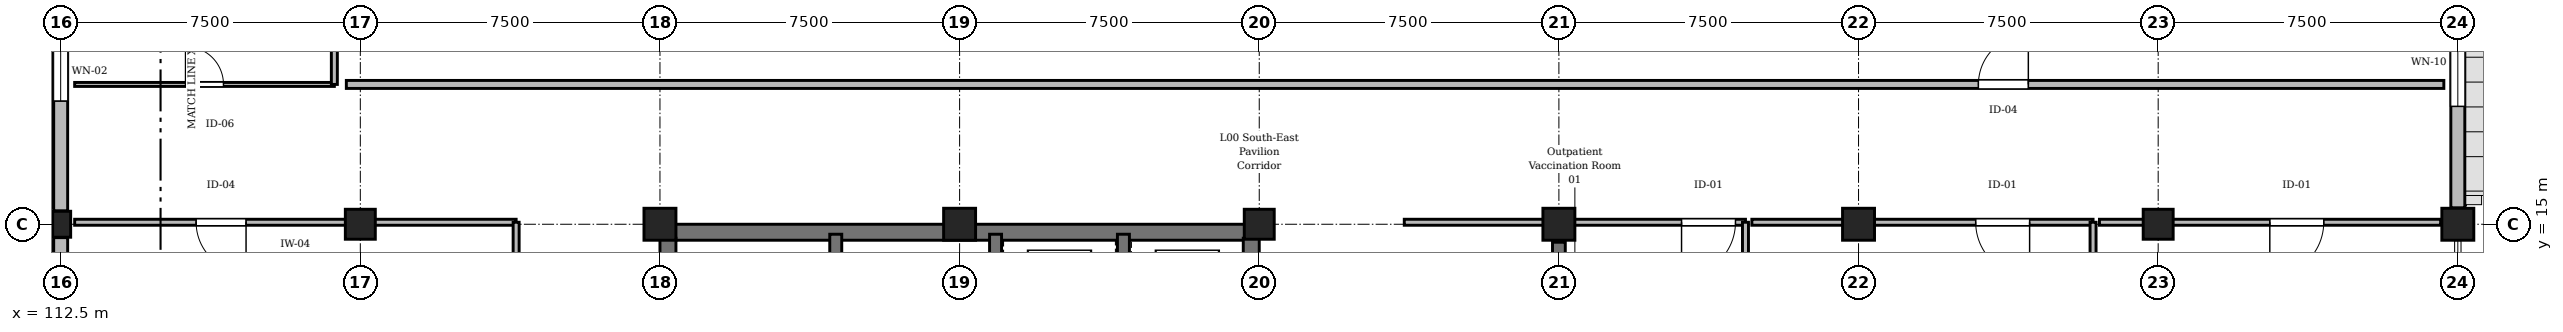
"""IFC4 building model, lengths in metres.
Left out: names, types, materials, properties, quantities, classifications, styles, units other than length and angle.
Written with IfcOpenShell. Run it as: python <this file> out.ifc"""

import sys

from ifc_helpers import new_model, si_unit, direction, frame, frame_2d, origin, origin_2d, place, context, subcontext, project, spatial, rectangle, circle, extrude, element, fill, save


model = new_model("IFC4")
c1 = context("Model", 3, precision=1e-05, world=origin(), true_north=direction((0.0, 1.0)))
c2 = subcontext(c1, "Body", "Model", "MODEL_VIEW")
j1 = project(units=[si_unit("LENGTHUNIT", "METRE"), si_unit("PLANEANGLEUNIT", "RADIAN")], contexts=[c1])
p1 = place(None, origin())
s1 = spatial("IfcSite", under=j1, at=p1, CompositionType="ELEMENT")
p2 = place(p1, origin())
s2 = spatial("IfcBuilding", under=s1, at=p2, CompositionType="ELEMENT")
p3 = place(p2, origin())
s3 = spatial("IfcBuildingStorey", under=s2, at=p3, CompositionType="ELEMENT", Elevation=0.0)
p4 = place(p3, frame((112.5, 15.0, 0.0), z_axis=(0.0, 0.0, 1.0), x_axis=(1.0, 0.0, 0.0)))
e1 = element("IfcColumn", 1, at=p4, inside=s3, PredefinedType="COLUMN", context=c2, shape_type="SweptSolid", body=[
    extrude(rectangle(XDim=0.5, YDim=0.65, at=origin_2d()), origin(), (0.0, 0.0, 1.0), 4.8),
])
p5 = place(p3, frame((120.0, 15.0, 0.0), z_axis=(0.0, 0.0, 1.0), x_axis=(1.0, 0.0, 0.0)))
e2 = element("IfcColumn", 2, at=p5, inside=s3, PredefinedType="COLUMN", context=c2, shape_type="SweptSolid", body=[
    extrude(circle(Radius=0.375, at=origin_2d()), origin(), (0.0, 0.0, 1.0), 4.8),
])
for number, where, z_axis, x_axis in (
    (3, (127.5, 15.0, 0.0), (0.0, 0.0, 1.0), (1.0, 0.0, 0.0)),
    (4, (135.0, 15.0, 0.0), (0.0, 0.0, 1.0), (1.0, 0.0, 0.0)),
):
    element("IfcColumn", number, at=place(p3, frame(where, z_axis=z_axis, x_axis=x_axis)), inside=s3, PredefinedType="COLUMN", context=c2, shape_type="SweptSolid", body=[
        extrude(rectangle(XDim=0.8, YDim=0.8, at=origin_2d()), origin(), (0.0, 0.0, 1.0), 4.8),
    ])
p6 = place(p3, frame((142.5, 15.0, 0.0), z_axis=(0.0, 0.0, 1.0), x_axis=(1.0, 0.0, 0.0)))
e5 = element("IfcColumn", 5, at=p6, inside=s3, PredefinedType="COLUMN", context=c2, shape_type="SweptSolid", body=[
    extrude(circle(Radius=0.375, at=origin_2d()), origin(), (0.0, 0.0, 1.0), 4.8),
])
for number, where, z_axis, x_axis in (
    (6, (150.0, 15.0, 0.0), (0.0, 0.0, 1.0), (1.0, 0.0, 0.0)),
    (7, (157.5, 15.0, 0.0), (0.0, 0.0, 1.0), (1.0, 0.0, 0.0)),
):
    element("IfcColumn", number, at=place(p3, frame(where, z_axis=z_axis, x_axis=x_axis)), inside=s3, PredefinedType="COLUMN", context=c2, shape_type="SweptSolid", body=[
        extrude(rectangle(XDim=0.8, YDim=0.8, at=origin_2d()), origin(), (0.0, 0.0, 1.0), 4.8),
    ])
p7 = place(p3, frame((165.0, 15.0, 0.0), z_axis=(0.0, 0.0, 1.0), x_axis=(1.0, 0.0, 0.0)))
e8 = element("IfcColumn", 8, at=p7, inside=s3, PredefinedType="COLUMN", context=c2, shape_type="SweptSolid", body=[
    extrude(circle(Radius=0.375, at=origin_2d()), origin(), (0.0, 0.0, 1.0), 4.8),
])
p8 = place(p3, frame((172.5, 15.0, 0.0), z_axis=(0.0, 0.0, 1.0), x_axis=(1.0, 0.0, 0.0)))
e9 = element("IfcColumn", 9, at=p8, inside=s3, PredefinedType="COLUMN", context=c2, shape_type="SweptSolid", body=[
    extrude(rectangle(XDim=0.8, YDim=0.8, at=origin_2d()), origin(), (0.0, 0.0, 1.0), 4.8),
])
p9 = place(p3, frame((150.0, 7.95, 0.0), z_axis=(0.0, 0.0, 1.0), x_axis=(0.0, 1.0, 0.0)))
e10 = element("IfcWall", 10, at=p9, inside=s3, PredefinedType="SHEAR", context=c2, shape_type="SweptSolid", body=[
    extrude(rectangle(XDim=6.6, YDim=0.32, at=frame_2d((3.3, 0.0))), origin(), (0.0, 0.0, 1.0), 3.95),
])
p10 = place(p3, frame((112.5, 7.885, 0.0), z_axis=(0.0, 0.0, 1.0), x_axis=(0.0, 1.0, 0.0)))
e11 = element("IfcWall", 11, at=p10, inside=s3, PredefinedType="STANDARD", context=c2, shape_type="SweptSolid", body=[
    extrude(rectangle(XDim=6.78, YDim=0.35, at=frame_2d((3.39, 0.0))), origin(), (0.0, 0.0, 1.0), 3.9),
])
p11 = place(p10, frame((2.49, 0.0, 0.9)))
e12 = element("IfcOpeningElement", 12, at=p11, cuts=e11, PredefinedType="OPENING", context=c2, shape_type="SweptSolid", body=[
    extrude(rectangle(XDim=1.8, YDim=2.4, at=frame_2d((0.9, 1.2))), frame((0.0, 0.185, 0.0), z_axis=(0.0, -1.0, 0.0), x_axis=(1.0, 0.0, 0.0)), (0.0, 0.0, 1.0), 0.37),
])
p12 = place(p3, frame((112.5, 15.335, 0.0), z_axis=(0.0, 0.0, 1.0), x_axis=(0.0, 1.0, 0.0)))
e13 = element("IfcWall", 13, at=p12, inside=s3, PredefinedType="STANDARD", context=c2, shape_type="SweptSolid", body=[
    extrude(rectangle(XDim=6.995, YDim=0.35, at=frame_2d((3.498, 0.0))), origin(), (0.0, 0.0, 1.0), 3.9),
])
p13 = place(p12, frame((2.748, 0.0, 0.9)))
e14 = element("IfcOpeningElement", 14, at=p13, cuts=e13, PredefinedType="OPENING", context=c2, shape_type="SweptSolid", body=[
    extrude(rectangle(XDim=1.5, YDim=2.4, at=frame_2d((0.75, 1.2))), frame((0.0, 0.185, 0.0), z_axis=(0.0, -1.0, 0.0), x_axis=(1.0, 0.0, 0.0)), (0.0, 0.0, 1.0), 0.37),
])
p14 = place(p3, frame((172.5, 22.09, 0.0), z_axis=(0.0, 0.0, 1.0), x_axis=(0.0, -1.0, 0.0)))
e15 = element("IfcWall", 15, at=p14, inside=s3, PredefinedType="STANDARD", context=c2, shape_type="SweptSolid", body=[
    extrude(rectangle(XDim=6.68, YDim=0.35, at=frame_2d((3.34, 0.0))), origin(), (0.0, 0.0, 1.0), 3.9),
])
p15 = place(p14, frame((2.54, 0.0, 0.9)))
e16 = element("IfcOpeningElement", 16, at=p15, cuts=e15, PredefinedType="OPENING", context=c2, shape_type="SweptSolid", body=[
    extrude(rectangle(XDim=1.6, YDim=1.95, at=frame_2d((0.8, 0.975))), frame((0.0, 0.185, 0.0), z_axis=(0.0, -1.0, 0.0), x_axis=(1.0, 0.0, 0.0)), (0.0, 0.0, 1.0), 0.37),
])
p16 = place(p3, frame((127.85, 14.8, 0.0), z_axis=(0.0, 0.0, 1.0), x_axis=(1.0, 0.0, 0.0)))
e17 = element("IfcWall", 17, at=p16, inside=s3, PredefinedType="SHEAR", context=c2, shape_type="SweptSolid", body=[
    extrude(rectangle(XDim=14.3, YDim=0.4, at=frame_2d((7.15, 0.0))), origin(), (0.0, 0.0, 1.0), 4.5),
])
p17 = place(p3, frame((127.7, 7.85, 0.0), z_axis=(0.0, 0.0, 1.0), x_axis=(0.0, 1.0, 0.0)))
e18 = element("IfcWall", 18, at=p17, inside=s3, PredefinedType="SHEAR", context=c2, shape_type="SweptSolid", body=[
    extrude(rectangle(XDim=6.8, YDim=0.4, at=frame_2d((3.4, 0.0))), origin(), (0.0, 0.0, 1.0), 4.5),
])
p18 = place(p3, frame((142.3, 11.6, 0.0), z_axis=(0.0, 0.0, 1.0), x_axis=(0.0, 1.0, 0.0)))
e19 = element("IfcWall", 19, at=p18, inside=s3, PredefinedType="SHEAR", context=c2, shape_type="SweptSolid", body=[
    extrude(rectangle(XDim=3.05, YDim=0.4, at=frame_2d((1.525, 0.0))), origin(), (0.0, 0.0, 1.0), 4.5),
])
for number, where, z_axis, x_axis in (
    (20, (131.9, 11.6, 0.0), (0.0, 0.0, 1.0), (0.0, 1.0, 0.0)),
    (21, (135.9, 11.6, 0.0), (0.0, 0.0, 1.0), (0.0, 1.0, 0.0)),
    (22, (139.1, 11.6, 0.0), (0.0, 0.0, 1.0), (0.0, 1.0, 0.0)),
):
    element("IfcWall", number, at=place(p3, frame(where, z_axis=z_axis, x_axis=x_axis)), inside=s3, PredefinedType="SHEAR", context=c2, shape_type="SweptSolid", body=[
        extrude(rectangle(XDim=3.15, YDim=0.3, at=frame_2d((1.575, 0.0))), origin(), (0.0, 0.0, 1.0), 4.5),
    ])
p19 = place(p3, frame((123.9, 15.05, 0.0), z_axis=(0.0, 0.0, 1.0), x_axis=(-1.0, 0.0, 0.0)))
e23 = element("IfcWall", 23, at=p19, inside=s3, PredefinedType="PARTITIONING", context=c2, shape_type="SweptSolid", body=[
    extrude(rectangle(XDim=11.05, YDim=0.15, at=frame_2d((5.525, 0.0))), origin(), (0.0, 0.0, 1.0), 3.835),
])
p20 = place(p19, frame((6.76, 0.0, 0.0)))
e24 = element("IfcOpeningElement", 24, at=p20, cuts=e23, PredefinedType="OPENING", context=c2, shape_type="SweptSolid", body=[
    extrude(rectangle(XDim=1.25, YDim=2.2, at=frame_2d((0.625, 1.1))), frame((0.0, 0.085, 0.0), z_axis=(0.0, -1.0, 0.0), x_axis=(1.0, 0.0, 0.0)), (0.0, 0.0, 1.0), 0.17),
])
p21 = place(p3, frame((154.67, 15.05, 0.0), z_axis=(0.0, 0.0, 1.0), x_axis=(-1.0, 0.0, 0.0)))
e25 = element("IfcWall", 25, at=p21, inside=s3, PredefinedType="PARTITIONING", context=c2, shape_type="SweptSolid", body=[
    extrude(rectangle(XDim=8.54, YDim=0.15, at=frame_2d((4.27, 0.0))), origin(), (0.0, 0.0, 1.0), 3.835),
])
p22 = place(p21, frame((0.25, 0.0, 0.0)))
e26 = element("IfcOpeningElement", 26, at=p22, cuts=e25, PredefinedType="OPENING", context=c2, shape_type="SweptSolid", body=[
    extrude(rectangle(XDim=1.35, YDim=2.25, at=frame_2d((0.675, 1.125))), frame((0.0, 0.085, 0.0), z_axis=(0.0, -1.0, 0.0), x_axis=(1.0, 0.0, 0.0)), (0.0, 0.0, 1.0), 0.17),
])
p23 = place(p3, frame((163.37, 15.05, 0.0), z_axis=(0.0, 0.0, 1.0), x_axis=(-1.0, 0.0, 0.0)))
e27 = element("IfcWall", 27, at=p23, inside=s3, PredefinedType="PARTITIONING", context=c2, shape_type="SweptSolid", body=[
    extrude(rectangle(XDim=8.54, YDim=0.15, at=frame_2d((4.27, 0.0))), origin(), (0.0, 0.0, 1.0), 3.835),
])
p24 = place(p23, frame((1.588, 0.0, 0.0)))
e28 = element("IfcOpeningElement", 28, at=p24, cuts=e27, PredefinedType="OPENING", context=c2, shape_type="SweptSolid", body=[
    extrude(rectangle(XDim=1.35, YDim=2.25, at=frame_2d((0.675, 1.125))), frame((0.0, 0.085, 0.0), z_axis=(0.0, -1.0, 0.0), x_axis=(1.0, 0.0, 0.0)), (0.0, 0.0, 1.0), 0.17),
])
p25 = place(p3, frame((172.07, 15.05, 0.0), z_axis=(0.0, 0.0, 1.0), x_axis=(-1.0, 0.0, 0.0)))
e29 = element("IfcWall", 29, at=p25, inside=s3, PredefinedType="PARTITIONING", context=c2, shape_type="SweptSolid", body=[
    extrude(rectangle(XDim=8.54, YDim=0.15, at=frame_2d((4.27, 0.0))), origin(), (0.0, 0.0, 1.0), 3.835),
])
p26 = place(p25, frame((2.926, 0.0, 0.0)))
e30 = element("IfcOpeningElement", 30, at=p26, cuts=e29, PredefinedType="OPENING", context=c2, shape_type="SweptSolid", body=[
    extrude(rectangle(XDim=1.35, YDim=2.25, at=frame_2d((0.675, 1.125))), frame((0.0, 0.085, 0.0), z_axis=(0.0, -1.0, 0.0), x_axis=(1.0, 0.0, 0.0)), (0.0, 0.0, 1.0), 0.17),
])
p27 = place(p3, frame((112.85, 18.5, 0.0), z_axis=(0.0, 0.0, 1.0), x_axis=(1.0, 0.0, 0.0)))
e31 = element("IfcWall", 31, at=p27, inside=s3, PredefinedType="PARTITIONING", context=c2, shape_type="SweptSolid", body=[
    extrude(rectangle(XDim=6.5, YDim=0.1, at=frame_2d((3.25, 0.0))), origin(), (0.0, 0.0, 1.0), 4.485),
])
p28 = place(p27, frame((2.775, 0.0, 0.0)))
e32 = element("IfcOpeningElement", 32, at=p28, cuts=e31, PredefinedType="OPENING", context=c2, shape_type="SweptSolid", body=[
    extrude(rectangle(XDim=0.95, YDim=2.15, at=frame_2d((0.475, 1.075))), frame((0.0, 0.06, 0.0), z_axis=(0.0, -1.0, 0.0), x_axis=(1.0, 0.0, 0.0)), (0.0, 0.0, 1.0), 0.12),
])
p29 = place(p3, frame((119.65, 18.5, 0.0), z_axis=(0.0, 0.0, 1.0), x_axis=(1.0, 0.0, 0.0)))
e33 = element("IfcWall", 33, at=p29, inside=s3, PredefinedType="STANDARD", context=c2, shape_type="SweptSolid", body=[
    extrude(rectangle(XDim=52.5, YDim=0.2, at=frame_2d((26.25, 0.0))), origin(), (0.0, 0.0, 1.0), 4.485),
])
p30 = place(p29, frame((40.85, 0.0, 0.0)))
e34 = element("IfcOpeningElement", 34, at=p30, cuts=e33, PredefinedType="OPENING", context=c2, shape_type="SweptSolid", body=[
    extrude(rectangle(XDim=1.25, YDim=2.2, at=frame_2d((0.625, 1.1))), frame((0.0, 0.11, 0.0), z_axis=(0.0, -1.0, 0.0), x_axis=(1.0, 0.0, 0.0)), (0.0, 0.0, 1.0), 0.22),
])
for number, where, z_axis, x_axis in (
    (35, (123.9, 7.85, 0.0), (0.0, 0.0, 1.0), (0.0, 1.0, 0.0)),
    (36, (154.67, 7.85, 0.0), (0.0, 0.0, 1.0), (0.0, 1.0, 0.0)),
    (37, (163.37, 7.85, 0.0), (0.0, 0.0, 1.0), (0.0, 1.0, 0.0)),
):
    element("IfcWall", number, at=place(p3, frame(where, z_axis=z_axis, x_axis=x_axis)), inside=s3, PredefinedType="PARTITIONING", context=c2, shape_type="SweptSolid", body=[
        extrude(rectangle(XDim=7.2, YDim=0.15, at=frame_2d((3.6, 0.0))), origin(), (0.0, 0.0, 1.0), 4.485),
    ])
p31 = place(p3, frame((119.35, 18.5, 0.0), z_axis=(0.0, 0.0, 1.0), x_axis=(0.0, 1.0, 0.0)))
e38 = element("IfcWall", 38, at=p31, inside=s3, PredefinedType="PARTITIONING", context=c2, shape_type="SweptSolid", body=[
    extrude(rectangle(XDim=3.65, YDim=0.15, at=frame_2d((1.825, 0.0))), origin(), (0.0, 0.0, 1.0), 4.485),
])
p32 = place(p13, origin())
e39 = element("IfcWindow", 39, at=p32, inside=s3, PartitioningType="SINGLE_PANEL", PredefinedType="WINDOW", context=c2, shape_type="SweptSolid", body=[
    extrude(rectangle(XDim=1.5, YDim=2.4, at=frame_2d((0.75, 1.2))), frame((0.0, 0.03, 0.0), z_axis=(0.0, -1.0, 0.0), x_axis=(1.0, 0.0, 0.0)), (0.0, 0.0, 1.0), 0.06),
])
fill(e14, e39)
p33 = place(p15, origin())
e40 = element("IfcWindow", 40, at=p33, inside=s3, PartitioningType="SINGLE_PANEL", PredefinedType="WINDOW", context=c2, shape_type="SweptSolid", body=[
    extrude(rectangle(XDim=1.6, YDim=1.95, at=frame_2d((0.8, 0.975))), frame((0.0, 0.03, 0.0), z_axis=(0.0, -1.0, 0.0), x_axis=(1.0, 0.0, 0.0)), (0.0, 0.0, 1.0), 0.06),
])
fill(e16, e40)
p34 = place(p20, origin())
e41 = element("IfcDoor", 41, at=p34, inside=s3, OperationType="SINGLE_SWING_LEFT", PredefinedType="DOOR", context=c2, shape_type="SweptSolid", body=[
    extrude(rectangle(XDim=1.25, YDim=2.2, at=frame_2d((0.625, 1.1))), frame((0.0, 0.025, 0.0), z_axis=(0.0, -1.0, 0.0), x_axis=(1.0, 0.0, 0.0)), (0.0, 0.0, 1.0), 0.05),
])
fill(e24, e41)
p35 = place(p22, origin())
e42 = element("IfcDoor", 42, at=p35, inside=s3, OperationType="SINGLE_SWING_RIGHT", PredefinedType="DOOR", context=c2, shape_type="SweptSolid", body=[
    extrude(rectangle(XDim=1.35, YDim=2.25, at=frame_2d((0.675, 1.125))), frame((0.0, 0.025, 0.0), z_axis=(0.0, -1.0, 0.0), x_axis=(1.0, 0.0, 0.0)), (0.0, 0.0, 1.0), 0.05),
])
fill(e26, e42)
p36 = place(p24, origin())
e43 = element("IfcDoor", 43, at=p36, inside=s3, OperationType="SINGLE_SWING_LEFT", PredefinedType="DOOR", context=c2, shape_type="SweptSolid", body=[
    extrude(rectangle(XDim=1.35, YDim=2.25, at=frame_2d((0.675, 1.125))), frame((0.0, 0.025, 0.0), z_axis=(0.0, -1.0, 0.0), x_axis=(1.0, 0.0, 0.0)), (0.0, 0.0, 1.0), 0.05),
])
fill(e28, e43)
p37 = place(p26, origin())
e44 = element("IfcDoor", 44, at=p37, inside=s3, OperationType="SINGLE_SWING_RIGHT", PredefinedType="DOOR", context=c2, shape_type="SweptSolid", body=[
    extrude(rectangle(XDim=1.35, YDim=2.25, at=frame_2d((0.675, 1.125))), frame((0.0, 0.025, 0.0), z_axis=(0.0, -1.0, 0.0), x_axis=(1.0, 0.0, 0.0)), (0.0, 0.0, 1.0), 0.05),
])
fill(e30, e44)
p38 = place(p28, origin())
e45 = element("IfcDoor", 45, at=p38, inside=s3, OperationType="SINGLE_SWING_LEFT", PredefinedType="DOOR", context=c2, shape_type="SweptSolid", body=[
    extrude(rectangle(XDim=0.95, YDim=2.15, at=frame_2d((0.475, 1.075))), frame((0.0, 0.025, 0.0), z_axis=(0.0, -1.0, 0.0), x_axis=(1.0, 0.0, 0.0)), (0.0, 0.0, 1.0), 0.05),
])
fill(e32, e45)
p39 = place(p30, origin())
e46 = element("IfcDoor", 46, at=p39, inside=s3, OperationType="SINGLE_SWING_RIGHT", PredefinedType="DOOR", context=c2, shape_type="SweptSolid", body=[
    extrude(rectangle(XDim=1.25, YDim=2.2, at=frame_2d((0.625, 1.1))), frame((0.0, 0.025, 0.0), z_axis=(0.0, -1.0, 0.0), x_axis=(1.0, 0.0, 0.0)), (0.0, 0.0, 1.0), 0.05),
])
fill(e34, e46)
save(model, sys.argv[1])
